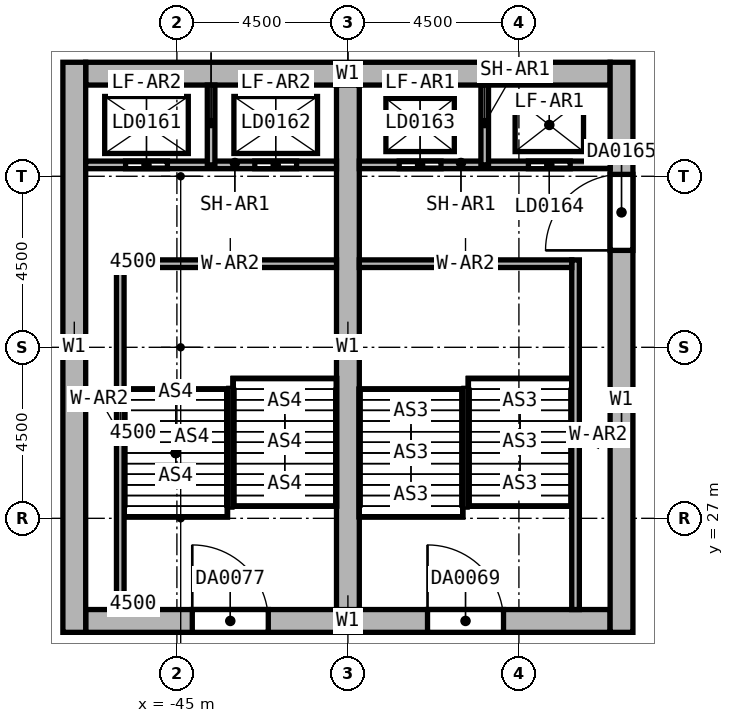
"""IFC4 building model, lengths in metres.
Left out: names, types, materials, properties, quantities, classifications, styles, units other than length and angle.
Written with IfcOpenShell. Run it as: python <this file> out.ifc"""

import sys

from ifc_helpers import new_model, si_unit, direction, frame, frame_2d, origin, place, context, subcontext, project, spatial, rectangle, extrude, element, fill, save


model = new_model("IFC4")
c1 = context("Model", 3, precision=1e-05, world=origin(), true_north=direction((0.0, 1.0)))
c2 = subcontext(c1, "Body", "Model", "MODEL_VIEW")
j1 = project(units=[si_unit("LENGTHUNIT", "METRE"), si_unit("PLANEANGLEUNIT", "RADIAN")], contexts=[c1])
p1 = place(None, origin())
s1 = spatial("IfcSite", under=j1, at=p1, CompositionType="ELEMENT")
p2 = place(p1, origin())
s2 = spatial("IfcBuilding", under=s1, at=p2, CompositionType="ELEMENT")
p3 = place(p2, origin())
s3 = spatial("IfcBuildingStorey", under=s2, at=p3, CompositionType="ELEMENT", Elevation=0.0)
p4 = place(p3, frame((-47.4, 38.7, 0.0), z_axis=(0.0, 0.0, 1.0), x_axis=(1.0, 0.0, 0.0)))
e1 = element("IfcWall", 1, at=p4, inside=s3, PredefinedType="SHEAR", context=c2, shape_type="SweptSolid", body=[
    extrude(rectangle(XDim=13.8, YDim=0.6, at=frame_2d((6.9, 0.0))), origin(), (0.0, 0.0, 1.0), 12.0),
])
p5 = place(p3, frame((-47.4, 24.3, 0.0), z_axis=(0.0, 0.0, 1.0), x_axis=(1.0, 0.0, 0.0)))
e2 = element("IfcWall", 2, at=p5, inside=s3, PredefinedType="SHEAR", context=c2, shape_type="SweptSolid", body=[
    extrude(rectangle(XDim=13.8, YDim=0.6, at=frame_2d((6.9, 0.0))), origin(), (0.0, 0.0, 1.0), 12.0),
])
p6 = place(p5, frame((8.995, 0.0, 0.0)))
e3 = element("IfcOpeningElement", 3, at=p6, cuts=e2, PredefinedType="OPENING", context=c2, shape_type="SweptSolid", body=[
    extrude(rectangle(XDim=2.0, YDim=2.4, at=frame_2d((1.0, 1.2))), frame((0.0, 0.3, 0.0), z_axis=(0.0, -1.0, 0.0), x_axis=(1.0, 0.0, 0.0)), (0.0, 0.0, 1.0), 0.6),
])
p7 = place(p5, frame((2.805, 0.0, 0.0)))
e4 = element("IfcOpeningElement", 4, at=p7, cuts=e2, PredefinedType="OPENING", context=c2, shape_type="SweptSolid", body=[
    extrude(rectangle(XDim=2.0, YDim=2.4, at=frame_2d((1.0, 1.2))), frame((0.0, 0.3, 0.0), z_axis=(0.0, -1.0, 0.0), x_axis=(1.0, 0.0, 0.0)), (0.0, 0.0, 1.0), 0.6),
])
p8 = place(p3, frame((-47.7, 24.0, 0.0), z_axis=(0.0, 0.0, 1.0), x_axis=(0.0, 1.0, 0.0)))
e5 = element("IfcWall", 5, at=p8, inside=s3, PredefinedType="SHEAR", context=c2, shape_type="SweptSolid", body=[
    extrude(rectangle(XDim=15.0, YDim=0.6, at=frame_2d((7.5, 0.0))), origin(), (0.0, 0.0, 1.0), 12.0),
])
p9 = place(p3, frame((-33.3, 24.0, 0.0), z_axis=(0.0, 0.0, 1.0), x_axis=(0.0, 1.0, 0.0)))
e6 = element("IfcWall", 6, at=p9, inside=s3, PredefinedType="SHEAR", context=c2, shape_type="SweptSolid", body=[
    extrude(rectangle(XDim=15.0, YDim=0.6, at=frame_2d((7.5, 0.0))), origin(), (0.0, 0.0, 1.0), 12.0),
])
p10 = place(p9, frame((10.05, 0.0, 0.0)))
e7 = element("IfcOpeningElement", 7, at=p10, cuts=e6, PredefinedType="OPENING", context=c2, shape_type="SweptSolid", body=[
    extrude(rectangle(XDim=2.0, YDim=2.4, at=frame_2d((1.0, 1.2))), frame((0.0, 0.3, 0.0), z_axis=(0.0, -1.0, 0.0), x_axis=(1.0, 0.0, 0.0)), (0.0, 0.0, 1.0), 0.6),
])
p11 = place(p3, frame((-40.5, 24.6, 0.0), z_axis=(0.0, 0.0, 1.0), x_axis=(0.0, 1.0, 0.0)))
e8 = element("IfcWall", 8, at=p11, inside=s3, PredefinedType="SHEAR", context=c2, shape_type="SweptSolid", body=[
    extrude(rectangle(XDim=13.8, YDim=0.6, at=frame_2d((6.9, 0.0))), origin(), (0.0, 0.0, 1.0), 12.0),
])
p12 = place(p3, frame((-34.51, 24.6, 0.0), z_axis=(0.0, 0.0, 1.0), x_axis=(0.0, 1.0, 0.0)))
e9 = element("IfcWall", 9, at=p12, inside=s3, PredefinedType="SOLIDWALL", context=c2, shape_type="SweptSolid", body=[
    extrude(rectangle(XDim=9.2, YDim=0.2, at=frame_2d((4.6, 0.0))), origin(), (0.0, 0.0, 1.0), 12.0),
])
p13 = place(p3, frame((-40.2, 33.7, 0.0), z_axis=(0.0, 0.0, 1.0), x_axis=(1.0, 0.0, 0.0)))
e10 = element("IfcWall", 10, at=p13, inside=s3, PredefinedType="SOLIDWALL", context=c2, shape_type="SweptSolid", body=[
    extrude(rectangle(XDim=5.59, YDim=0.2, at=frame_2d((2.795, 0.0))), origin(), (0.0, 0.0, 1.0), 12.0),
])
p14 = place(p3, frame((-46.49, 24.6, 0.0), z_axis=(0.0, 0.0, 1.0), x_axis=(0.0, 1.0, 0.0)))
e11 = element("IfcWall", 11, at=p14, inside=s3, PredefinedType="SOLIDWALL", context=c2, shape_type="SweptSolid", body=[
    extrude(rectangle(XDim=9.2, YDim=0.2, at=frame_2d((4.6, 0.0))), origin(), (0.0, 0.0, 1.0), 12.0),
])
p15 = place(p3, frame((-46.39, 33.7, 0.0), z_axis=(0.0, 0.0, 1.0), x_axis=(1.0, 0.0, 0.0)))
e12 = element("IfcWall", 12, at=p15, inside=s3, PredefinedType="SOLIDWALL", context=c2, shape_type="SweptSolid", body=[
    extrude(rectangle(XDim=5.59, YDim=0.2, at=frame_2d((2.795, 0.0))), origin(), (0.0, 0.0, 1.0), 12.0),
])
p16 = place(p3, frame((-47.4, 36.3, 0.0), z_axis=(0.0, 0.0, 1.0), x_axis=(1.0, 0.0, 0.0)))
e13 = element("IfcWall", 13, at=p16, inside=s3, PredefinedType="SHEAR", context=c2, shape_type="SweptSolid", body=[
    extrude(rectangle(XDim=6.6, YDim=0.2, at=frame_2d((3.3, 0.0))), origin(), (0.0, 0.0, 1.0), 12.0),
])
p17 = place(p16, frame((1.05, 0.0, 0.0)))
e14 = element("IfcOpeningElement", 14, at=p17, cuts=e13, PredefinedType="OPENING", context=c2, shape_type="SweptSolid", body=[
    extrude(rectangle(XDim=1.1, YDim=2.4, at=frame_2d((0.55, 1.2))), frame((0.0, 0.1, 0.0), z_axis=(0.0, -1.0, 0.0), x_axis=(1.0, 0.0, 0.0)), (0.0, 0.0, 1.0), 0.2),
])
p18 = place(p16, frame((4.45, 0.0, 0.0)))
e15 = element("IfcOpeningElement", 15, at=p18, cuts=e13, PredefinedType="OPENING", context=c2, shape_type="SweptSolid", body=[
    extrude(rectangle(XDim=1.1, YDim=2.4, at=frame_2d((0.55, 1.2))), frame((0.0, 0.1, 0.0), z_axis=(0.0, -1.0, 0.0), x_axis=(1.0, 0.0, 0.0)), (0.0, 0.0, 1.0), 0.2),
])
p19 = place(p3, frame((-40.2, 36.3, 0.0), z_axis=(0.0, 0.0, 1.0), x_axis=(1.0, 0.0, 0.0)))
e16 = element("IfcWall", 16, at=p19, inside=s3, PredefinedType="SHEAR", context=c2, shape_type="SweptSolid", body=[
    extrude(rectangle(XDim=6.6, YDim=0.2, at=frame_2d((3.3, 0.0))), origin(), (0.0, 0.0, 1.0), 12.0),
])
p20 = place(p19, frame((1.05, 0.0, 0.0)))
e17 = element("IfcOpeningElement", 17, at=p20, cuts=e16, PredefinedType="OPENING", context=c2, shape_type="SweptSolid", body=[
    extrude(rectangle(XDim=1.1, YDim=2.4, at=frame_2d((0.55, 1.2))), frame((0.0, 0.1, 0.0), z_axis=(0.0, -1.0, 0.0), x_axis=(1.0, 0.0, 0.0)), (0.0, 0.0, 1.0), 0.2),
])
p21 = place(p19, frame((4.45, 0.0, 0.0)))
e18 = element("IfcOpeningElement", 18, at=p21, cuts=e16, PredefinedType="OPENING", context=c2, shape_type="SweptSolid", body=[
    extrude(rectangle(XDim=1.1, YDim=2.4, at=frame_2d((0.55, 1.2))), frame((0.0, 0.1, 0.0), z_axis=(0.0, -1.0, 0.0), x_axis=(1.0, 0.0, 0.0)), (0.0, 0.0, 1.0), 0.2),
])
for number, where, z_axis, x_axis in (
    (19, (-36.9, 36.3, 0.0), (0.0, 0.0, 1.0), (0.0, 1.0, 0.0)),
    (20, (-44.1, 36.3, 0.0), (0.0, 0.0, 1.0), (0.0, 1.0, 0.0)),
):
    element("IfcWall", number, at=place(p3, frame(where, z_axis=z_axis, x_axis=x_axis)), inside=s3, PredefinedType="SHEAR", context=c2, shape_type="SweptSolid", body=[
        extrude(rectangle(XDim=2.1, YDim=0.2, at=frame_2d((1.05, 0.0))), origin(), (0.0, 0.0, 1.0), 12.0),
    ])
p22 = place(p6, frame((2.0, 0.0, 0.0), z_axis=(0.0, 0.0, 1.0), x_axis=(-1.0, 0.0, 0.0)))
e21 = element("IfcDoor", 21, at=p22, inside=s3, OperationType="DOUBLE_DOOR_SINGLE_SWING", PredefinedType="DOOR", context=c2, shape_type="SweptSolid", body=[
    extrude(rectangle(XDim=2.0, YDim=2.4, at=frame_2d((1.0, 1.2))), frame((0.0, 0.025, 0.0), z_axis=(0.0, -1.0, 0.0), x_axis=(1.0, 0.0, 0.0)), (0.0, 0.0, 1.0), 0.05),
])
fill(e3, e21)
p23 = place(p7, frame((2.0, 0.0, 0.0), z_axis=(0.0, 0.0, 1.0), x_axis=(-1.0, 0.0, 0.0)))
e22 = element("IfcDoor", 22, at=p23, inside=s3, OperationType="DOUBLE_DOOR_SINGLE_SWING", PredefinedType="DOOR", context=c2, shape_type="SweptSolid", body=[
    extrude(rectangle(XDim=2.0, YDim=2.4, at=frame_2d((1.0, 1.2))), frame((0.0, 0.025, 0.0), z_axis=(0.0, -1.0, 0.0), x_axis=(1.0, 0.0, 0.0)), (0.0, 0.0, 1.0), 0.05),
])
fill(e4, e22)
p24 = place(p17, origin())
e23 = element("IfcDoor", 23, at=p24, inside=s3, OperationType="DOUBLE_DOOR_SLIDING", PredefinedType="DOOR", context=c2, shape_type="SweptSolid", body=[
    extrude(rectangle(XDim=1.1, YDim=2.4, at=frame_2d((0.55, 1.2))), frame((0.0, 0.025, 0.0), z_axis=(0.0, -1.0, 0.0), x_axis=(1.0, 0.0, 0.0)), (0.0, 0.0, 1.0), 0.05),
])
fill(e14, e23)
p25 = place(p18, origin())
e24 = element("IfcDoor", 24, at=p25, inside=s3, OperationType="DOUBLE_DOOR_SLIDING", PredefinedType="DOOR", context=c2, shape_type="SweptSolid", body=[
    extrude(rectangle(XDim=1.1, YDim=2.4, at=frame_2d((0.55, 1.2))), frame((0.0, 0.025, 0.0), z_axis=(0.0, -1.0, 0.0), x_axis=(1.0, 0.0, 0.0)), (0.0, 0.0, 1.0), 0.05),
])
fill(e15, e24)
p26 = place(p20, origin())
e25 = element("IfcDoor", 25, at=p26, inside=s3, OperationType="DOUBLE_DOOR_SLIDING", PredefinedType="DOOR", context=c2, shape_type="SweptSolid", body=[
    extrude(rectangle(XDim=1.1, YDim=2.4, at=frame_2d((0.55, 1.2))), frame((0.0, 0.025, 0.0), z_axis=(0.0, -1.0, 0.0), x_axis=(1.0, 0.0, 0.0)), (0.0, 0.0, 1.0), 0.05),
])
fill(e17, e25)
p27 = place(p21, origin())
e26 = element("IfcDoor", 26, at=p27, inside=s3, OperationType="DOUBLE_DOOR_SLIDING", PredefinedType="DOOR", context=c2, shape_type="SweptSolid", body=[
    extrude(rectangle(XDim=1.1, YDim=2.4, at=frame_2d((0.55, 1.2))), frame((0.0, 0.025, 0.0), z_axis=(0.0, -1.0, 0.0), x_axis=(1.0, 0.0, 0.0)), (0.0, 0.0, 1.0), 0.05),
])
fill(e18, e26)
p28 = place(p10, origin())
e27 = element("IfcDoor", 27, at=p28, inside=s3, OperationType="DOUBLE_DOOR_SINGLE_SWING", PredefinedType="DOOR", context=c2, shape_type="SweptSolid", body=[
    extrude(rectangle(XDim=2.0, YDim=2.4, at=frame_2d((1.0, 1.2))), frame((0.0, 0.025, 0.0), z_axis=(0.0, -1.0, 0.0), x_axis=(1.0, 0.0, 0.0)), (0.0, 0.0, 1.0), 0.05),
])
fill(e7, e27)
save(model, sys.argv[1])
